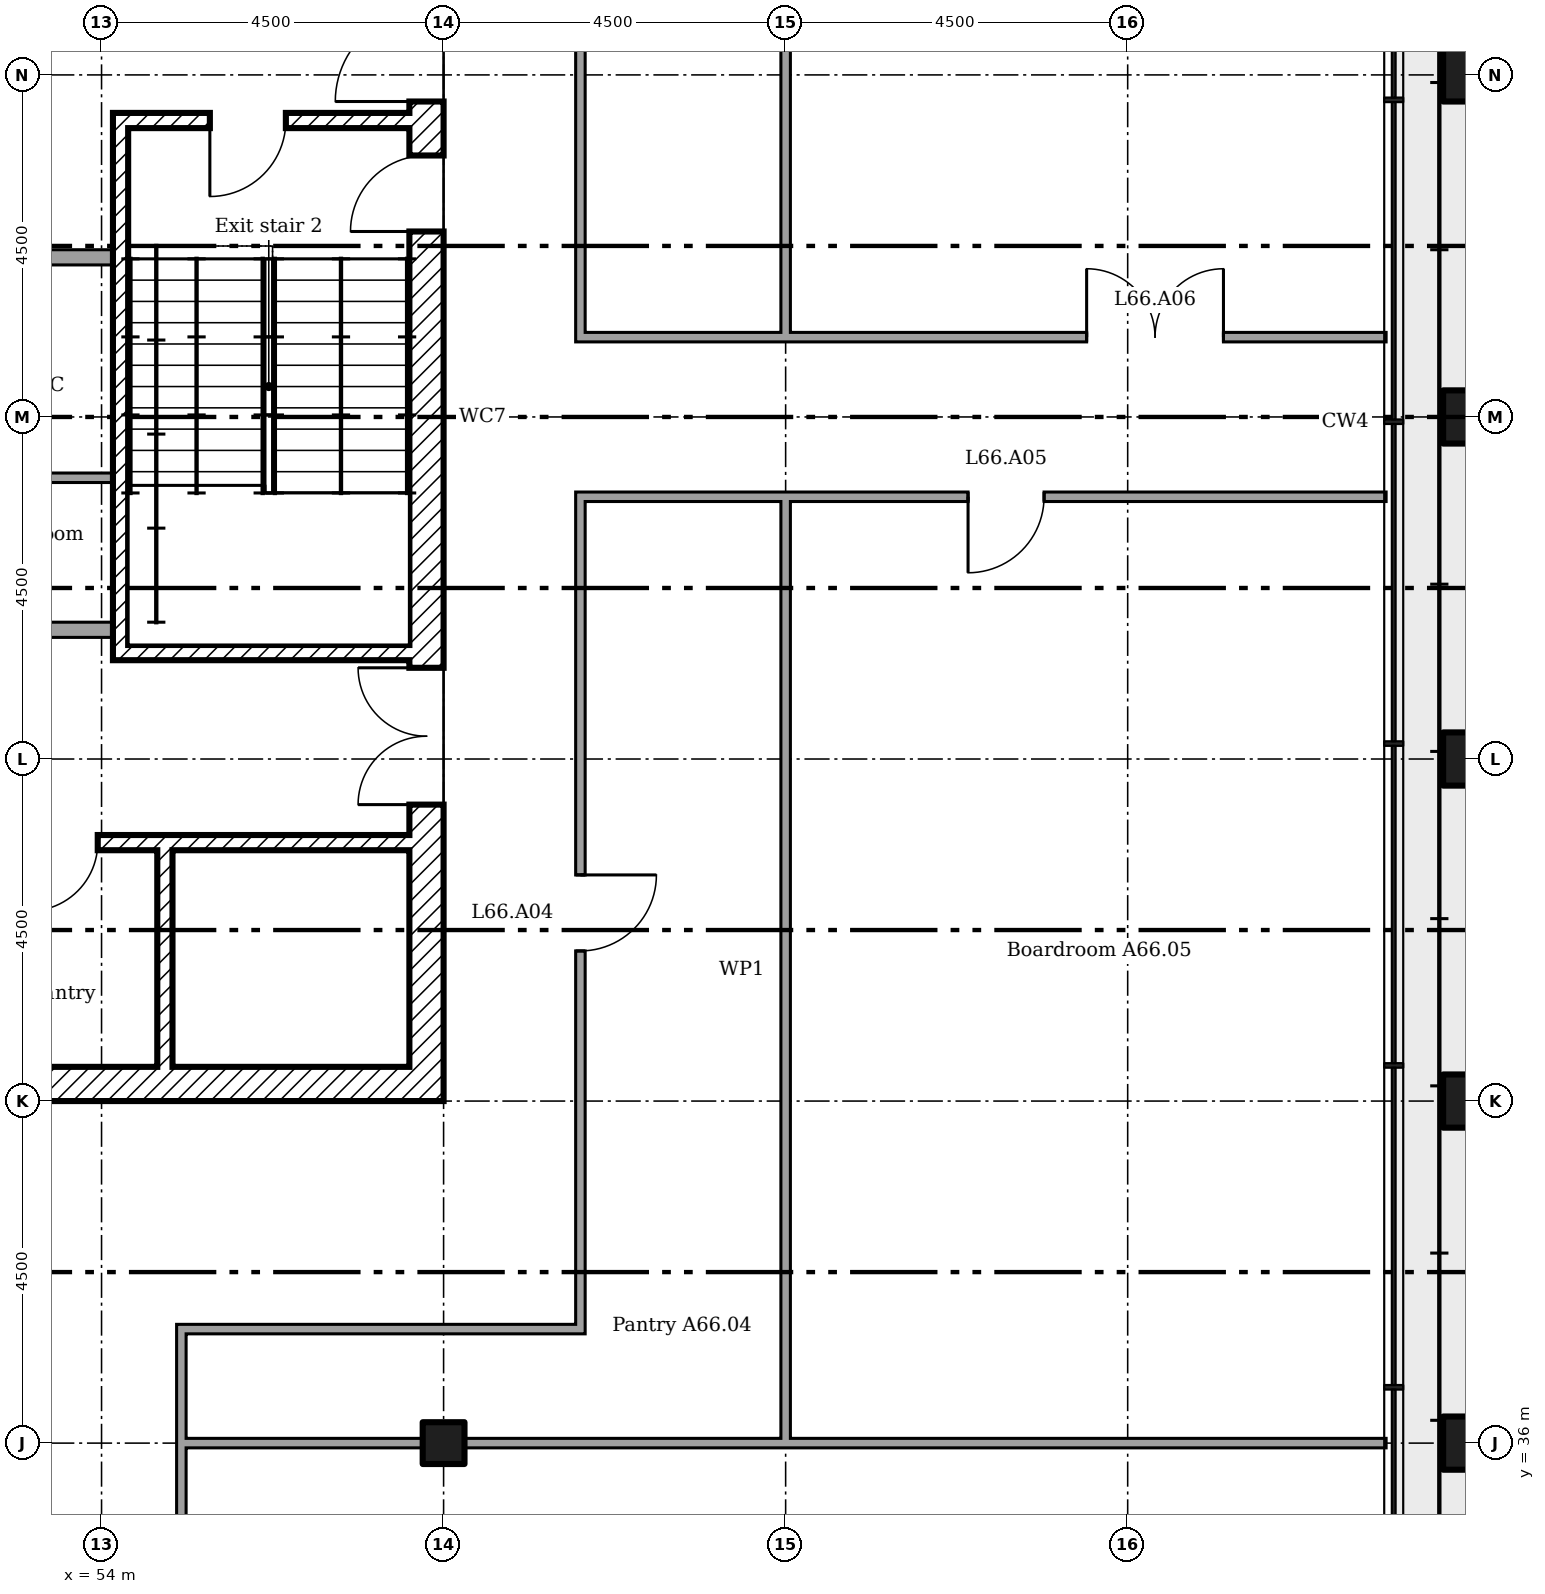
"""IFC4 building model, lengths in metres.
Left out: names, types, materials, properties, quantities, classifications, styles, units other than length and angle.
Written with IfcOpenShell. Run it as: python <this file> out.ifc"""

import sys

from ifc_helpers import new_model, si_unit, direction, frame, frame_2d, origin, origin_2d, place, context, subcontext, project, spatial, rectangle, extrude, element, fill, save


model = new_model("IFC4")
c1 = context("Model", 3, precision=1e-05, world=origin(), true_north=direction((0.0, 1.0)))
c2 = subcontext(c1, "Body", "Model", "MODEL_VIEW")
j1 = project(units=[si_unit("LENGTHUNIT", "METRE"), si_unit("PLANEANGLEUNIT", "RADIAN")], contexts=[c1])
p1 = place(None, origin())
s1 = spatial("IfcSite", under=j1, at=p1, CompositionType="ELEMENT")
p2 = place(p1, origin())
s2 = spatial("IfcBuilding", under=s1, at=p2, CompositionType="ELEMENT")
p3 = place(p2, frame((0.0, 0.0, 259.4)))
s3 = spatial("IfcBuildingStorey", under=s2, at=p3, CompositionType="ELEMENT", Elevation=259.4)
for number, where in (
    (1, (72.0, 36.0, 0.0)),
    (2, (72.0, 40.5, 0.0)),
    (3, (72.0, 45.0, 0.0)),
    (4, (72.0, 49.5, 0.0)),
    (5, (72.0, 54.0, 0.0)),
):
    element("IfcColumn", number, at=place(p3, frame(where)), inside=s3, PredefinedType="COLUMN", context=c2, shape_type="SweptSolid", body=[
        extrude(rectangle(XDim=0.7, YDim=0.7, at=origin_2d()), origin(), (0.0, 0.0, 1.0), 4.2),
    ])
p4 = place(p3, frame((58.5, 36.0, 0.0)))
e6 = element("IfcColumn", 6, at=p4, inside=s3, PredefinedType="COLUMN", context=c2, shape_type="SweptSolid", body=[
    extrude(rectangle(XDim=0.55, YDim=0.55, at=origin_2d()), origin(), (0.0, 0.0, 1.0), 4.2),
])
p5 = place(p3, frame((58.275, 40.5, 0.0), z_axis=(0.0, 0.0, 1.0), x_axis=(0.0, 1.0, 0.0)))
e7 = element("IfcWall", 7, at=p5, inside=s3, PredefinedType="SHEAR", context=c2, shape_type="SweptSolid", body=[
    extrude(rectangle(XDim=18.0, YDim=0.45, at=frame_2d((9.0, 0.0))), origin(), (0.0, 0.0, 1.0), 3.925),
])
p6 = place(p5, frame((13.15, 0.0, 0.0)))
e8 = element("IfcOpeningElement", 8, at=p6, cuts=e7, PredefinedType="OPENING", context=c2, shape_type="SweptSolid", body=[
    extrude(rectangle(XDim=1.2, YDim=2.1, at=frame_2d((0.6, 1.05))), frame((0.0, 0.235, 0.0), z_axis=(0.0, -1.0, 0.0), x_axis=(1.0, 0.0, 0.0)), (0.0, 0.0, 1.0), 0.47),
])
p7 = place(p5, frame((3.9, 0.0, 0.0)))
e9 = element("IfcOpeningElement", 9, at=p7, cuts=e7, PredefinedType="OPENING", context=c2, shape_type="SweptSolid", body=[
    extrude(rectangle(XDim=1.8, YDim=2.1, at=frame_2d((0.9, 1.05))), frame((0.0, 0.235, 0.0), z_axis=(0.0, -1.0, 0.0), x_axis=(1.0, 0.0, 0.0)), (0.0, 0.0, 1.0), 0.47),
])
p8 = place(p5, frame((11.44, 0.0, 0.0)))
e10 = element("IfcOpeningElement", 10, at=p8, cuts=e7, PredefinedType="OPENING", context=c2, shape_type="SweptSolid", body=[
    extrude(rectangle(XDim=1.0, YDim=2.1, at=frame_2d((0.5, 1.05))), frame((0.0, 0.235, 0.0), z_axis=(0.0, -1.0, 0.0), x_axis=(1.0, 0.0, 0.0)), (0.0, 0.0, 1.0), 0.47),
])
p9 = place(p3, frame((40.5, 40.725, 0.0)))
e11 = element("IfcWall", 11, at=p9, inside=s3, PredefinedType="SHEAR", context=c2, shape_type="SweptSolid", body=[
    extrude(rectangle(XDim=17.55, YDim=0.45, at=frame_2d((8.775, 0.0))), origin(), (0.0, 0.0, 1.0), 3.925),
])
p10 = place(p3, frame((54.833, 40.95, 0.0), z_axis=(0.0, 0.0, 1.0), x_axis=(0.0, 1.0, 0.0)))
e12 = element("IfcWall", 12, at=p10, inside=s3, PredefinedType="SHEAR", context=c2, shape_type="SweptSolid", body=[
    extrude(rectangle(XDim=2.85, YDim=0.2, at=frame_2d((1.425, 0.0))), origin(), (0.0, 0.0, 1.0), 3.925),
])
p11 = place(p3, frame((40.95, 43.9, 0.0)))
e13 = element("IfcWall", 13, at=p11, inside=s3, PredefinedType="SHEAR", context=c2, shape_type="SweptSolid", body=[
    extrude(rectangle(XDim=17.1, YDim=0.2, at=frame_2d((8.55, 0.0))), origin(), (0.0, 0.0, 1.0), 3.925),
])
p12 = place(p11, frame((1.433, 0.0, 0.0)))
e14 = element("IfcOpeningElement", 14, at=p12, cuts=e13, PredefinedType="OPENING", context=c2, shape_type="SweptSolid", body=[
    extrude(rectangle(XDim=0.9, YDim=2.1, at=frame_2d((0.45, 1.05))), frame((0.0, 0.11, 0.0), z_axis=(0.0, -1.0, 0.0), x_axis=(1.0, 0.0, 0.0)), (0.0, 0.0, 1.0), 0.22),
])
p13 = place(p11, frame((4.1, 0.0, 0.0)))
e15 = element("IfcOpeningElement", 15, at=p13, cuts=e13, PredefinedType="OPENING", context=c2, shape_type="SweptSolid", body=[
    extrude(rectangle(XDim=0.9, YDim=2.1, at=frame_2d((0.45, 1.05))), frame((0.0, 0.11, 0.0), z_axis=(0.0, -1.0, 0.0), x_axis=(1.0, 0.0, 0.0)), (0.0, 0.0, 1.0), 0.22),
])
p14 = place(p11, frame((6.767, 0.0, 0.0)))
e16 = element("IfcOpeningElement", 16, at=p14, cuts=e13, PredefinedType="OPENING", context=c2, shape_type="SweptSolid", body=[
    extrude(rectangle(XDim=0.9, YDim=2.1, at=frame_2d((0.45, 1.05))), frame((0.0, 0.11, 0.0), z_axis=(0.0, -1.0, 0.0), x_axis=(1.0, 0.0, 0.0)), (0.0, 0.0, 1.0), 0.22),
])
p15 = place(p11, frame((9.433, 0.0, 0.0)))
e17 = element("IfcOpeningElement", 17, at=p15, cuts=e13, PredefinedType="OPENING", context=c2, shape_type="SweptSolid", body=[
    extrude(rectangle(XDim=0.9, YDim=2.1, at=frame_2d((0.45, 1.05))), frame((0.0, 0.11, 0.0), z_axis=(0.0, -1.0, 0.0), x_axis=(1.0, 0.0, 0.0)), (0.0, 0.0, 1.0), 0.22),
])
p16 = place(p11, frame((12.1, 0.0, 0.0)))
e18 = element("IfcOpeningElement", 18, at=p16, cuts=e13, PredefinedType="OPENING", context=c2, shape_type="SweptSolid", body=[
    extrude(rectangle(XDim=0.9, YDim=2.1, at=frame_2d((0.45, 1.05))), frame((0.0, 0.11, 0.0), z_axis=(0.0, -1.0, 0.0), x_axis=(1.0, 0.0, 0.0)), (0.0, 0.0, 1.0), 0.22),
])
p17 = place(p3, frame((54.15, 53.4, 0.0)))
e19 = element("IfcWall", 19, at=p17, inside=s3, PredefinedType="SHEAR", context=c2, shape_type="SweptSolid", body=[
    extrude(rectangle(XDim=3.9, YDim=0.2, at=frame_2d((1.95, 0.0))), origin(), (0.0, 0.0, 1.0), 3.925),
])
p18 = place(p17, frame((1.275, 0.0, 0.0)))
e20 = element("IfcOpeningElement", 20, at=p18, cuts=e19, PredefinedType="OPENING", context=c2, shape_type="SweptSolid", body=[
    extrude(rectangle(XDim=1.0, YDim=2.1, at=frame_2d((0.5, 1.05))), frame((0.0, 0.11, 0.0), z_axis=(0.0, -1.0, 0.0), x_axis=(1.0, 0.0, 0.0)), (0.0, 0.0, 1.0), 0.22),
])
p19 = place(p3, frame((54.15, 46.4, 0.0)))
e21 = element("IfcWall", 21, at=p19, inside=s3, PredefinedType="SHEAR", context=c2, shape_type="SweptSolid", body=[
    extrude(rectangle(XDim=3.9, YDim=0.2, at=frame_2d((1.95, 0.0))), origin(), (0.0, 0.0, 1.0), 3.925),
])
p20 = place(p3, frame((54.25, 46.5, 0.0), z_axis=(0.0, 0.0, 1.0), x_axis=(0.0, 1.0, 0.0)))
e22 = element("IfcWall", 22, at=p20, inside=s3, PredefinedType="SHEAR", context=c2, shape_type="SweptSolid", body=[
    extrude(rectangle(XDim=6.8, YDim=0.2, at=frame_2d((3.4, 0.0))), origin(), (0.0, 0.0, 1.0), 3.925),
])
p21 = place(p3, frame((44.85, 51.6, 0.0)))
e23 = element("IfcWall", 23, at=p21, inside=s3, PredefinedType="PARTITIONING", context=c2, shape_type="SweptSolid", body=[
    extrude(rectangle(XDim=9.3, YDim=0.2, at=frame_2d((4.65, 0.0))), origin(), (0.0, 0.0, 1.0), 3.925),
])
p22 = place(p21, frame((4.075, 0.0, 0.0)))
e24 = element("IfcOpeningElement", 24, at=p22, cuts=e23, PredefinedType="OPENING", context=c2, shape_type="SweptSolid", body=[
    extrude(rectangle(XDim=0.9, YDim=2.1, at=frame_2d((0.45, 1.05))), frame((0.0, 0.11, 0.0), z_axis=(0.0, -1.0, 0.0), x_axis=(1.0, 0.0, 0.0)), (0.0, 0.0, 1.0), 0.22),
])
p23 = place(p21, frame((6.825, 0.0, 0.0)))
e25 = element("IfcOpeningElement", 25, at=p23, cuts=e23, PredefinedType="OPENING", context=c2, shape_type="SweptSolid", body=[
    extrude(rectangle(XDim=0.9, YDim=2.1, at=frame_2d((0.45, 1.05))), frame((0.0, 0.11, 0.0), z_axis=(0.0, -1.0, 0.0), x_axis=(1.0, 0.0, 0.0)), (0.0, 0.0, 1.0), 0.22),
])
p24 = place(p3, frame((44.85, 46.7, 0.0)))
e26 = element("IfcWall", 26, at=p24, inside=s3, PredefinedType="PARTITIONING", context=c2, shape_type="SweptSolid", body=[
    extrude(rectangle(XDim=9.3, YDim=0.2, at=frame_2d((4.65, 0.0))), origin(), (0.0, 0.0, 1.0), 3.925),
])
p25 = place(p24, frame((2.175, 0.0, 0.0)))
e27 = element("IfcOpeningElement", 27, at=p25, cuts=e26, PredefinedType="OPENING", context=c2, shape_type="SweptSolid", body=[
    extrude(rectangle(XDim=0.9, YDim=2.1, at=frame_2d((0.45, 1.05))), frame((0.0, 0.11, 0.0), z_axis=(0.0, -1.0, 0.0), x_axis=(1.0, 0.0, 0.0)), (0.0, 0.0, 1.0), 0.22),
])
p26 = place(p24, frame((6.825, 0.0, 0.0)))
e28 = element("IfcOpeningElement", 28, at=p26, cuts=e26, PredefinedType="OPENING", context=c2, shape_type="SweptSolid", body=[
    extrude(rectangle(XDim=0.9, YDim=2.1, at=frame_2d((0.45, 1.05))), frame((0.0, 0.11, 0.0), z_axis=(0.0, -1.0, 0.0), x_axis=(1.0, 0.0, 0.0)), (0.0, 0.0, 1.0), 0.22),
])
p27 = place(p3, frame((54.15, 48.7, 0.0), z_axis=(0.0, 0.0, 1.0), x_axis=(-1.0, 0.0, 0.0)))
e29 = element("IfcWall", 29, at=p27, inside=s3, PredefinedType="PARTITIONING", context=c2, shape_type="SweptSolid", body=[
    extrude(rectangle(XDim=3.987, YDim=0.125, at=frame_2d((1.994, 0.0))), origin(), (0.0, 0.0, 1.0), 3.925),
])
p28 = place(p3, frame((55.05, 36.0, 0.0)))
e30 = element("IfcWall", 30, at=p28, inside=s3, PredefinedType="PARTITIONING", context=c2, shape_type="SweptSolid", body=[
    extrude(rectangle(XDim=3.175, YDim=0.125, at=frame_2d((1.587, 0.0))), origin(), (0.0, 0.0, 1.0), 4.025),
])
p29 = place(p3, frame((58.775, 36.0, 0.0)))
e31 = element("IfcWall", 31, at=p29, inside=s3, PredefinedType="PARTITIONING", context=c2, shape_type="SweptSolid", body=[
    extrude(rectangle(XDim=12.125, YDim=0.125, at=frame_2d((6.062, 0.0))), origin(), (0.0, 0.0, 1.0), 3.267),
])
p30 = place(p3, frame((54.988, 37.5, 0.0)))
e32 = element("IfcWall", 32, at=p30, inside=s3, PredefinedType="PARTITIONING", context=c2, shape_type="SweptSolid", body=[
    extrude(rectangle(XDim=5.375, YDim=0.125, at=frame_2d((2.688, 0.0))), origin(), (0.0, 0.0, 1.0), 4.025),
])
p31 = place(p3, frame((60.238, 48.45, 0.0)))
e33 = element("IfcWall", 33, at=p31, inside=s3, PredefinedType="PARTITIONING", context=c2, shape_type="SweptSolid", body=[
    extrude(rectangle(XDim=10.662, YDim=0.125, at=frame_2d((5.331, 0.0))), origin(), (0.0, 0.0, 1.0), 4.025),
])
p32 = place(p31, frame((5.163, 0.0, 0.0)))
e34 = element("IfcOpeningElement", 34, at=p32, cuts=e33, PredefinedType="OPENING", context=c2, shape_type="SweptSolid", body=[
    extrude(rectangle(XDim=1.0, YDim=2.1, at=frame_2d((0.5, 1.05))), frame((0.0, 0.073, 0.0), z_axis=(0.0, -1.0, 0.0), x_axis=(1.0, 0.0, 0.0)), (0.0, 0.0, 1.0), 0.145),
])
p33 = place(p3, frame((60.238, 50.55, 0.0)))
e35 = element("IfcWall", 35, at=p33, inside=s3, PredefinedType="PARTITIONING", context=c2, shape_type="SweptSolid", body=[
    extrude(rectangle(XDim=10.662, YDim=0.125, at=frame_2d((5.331, 0.0))), origin(), (0.0, 0.0, 1.0), 4.025),
])
p34 = place(p33, frame((6.722, 0.0, 0.0)))
e36 = element("IfcOpeningElement", 36, at=p34, cuts=e35, PredefinedType="OPENING", context=c2, shape_type="SweptSolid", body=[
    extrude(rectangle(XDim=1.8, YDim=2.1, at=frame_2d((0.9, 1.05))), frame((0.0, 0.073, 0.0), z_axis=(0.0, -1.0, 0.0), x_axis=(1.0, 0.0, 0.0)), (0.0, 0.0, 1.0), 0.145),
])
p35 = place(p3, frame((55.05, 28.1, 0.0), z_axis=(0.0, 0.0, 1.0), x_axis=(0.0, 1.0, 0.0)))
e37 = element("IfcWall", 37, at=p35, inside=s3, PredefinedType="PARTITIONING", context=c2, shape_type="SweptSolid", body=[
    extrude(rectangle(XDim=9.337, YDim=0.125, at=frame_2d((4.669, 0.0))), origin(), (0.0, 0.0, 1.0), 4.025),
])
p36 = place(p35, frame((3.96, 0.0, 0.0)))
e38 = element("IfcOpeningElement", 38, at=p36, cuts=e37, PredefinedType="OPENING", context=c2, shape_type="SweptSolid", body=[
    extrude(rectangle(XDim=1.8, YDim=2.1, at=frame_2d((0.9, 1.05))), frame((0.0, 0.073, 0.0), z_axis=(0.0, -1.0, 0.0), x_axis=(1.0, 0.0, 0.0)), (0.0, 0.0, 1.0), 0.145),
])
p37 = place(p3, frame((60.3, 37.562, 0.0), z_axis=(0.0, 0.0, 1.0), x_axis=(0.0, 1.0, 0.0)))
e39 = element("IfcWall", 39, at=p37, inside=s3, PredefinedType="PARTITIONING", context=c2, shape_type="SweptSolid", body=[
    extrude(rectangle(XDim=10.825, YDim=0.125, at=frame_2d((5.413, 0.0))), origin(), (0.0, 0.0, 1.0), 4.025),
])
p38 = place(p37, frame((4.913, 0.0, 0.0)))
e40 = element("IfcOpeningElement", 40, at=p38, cuts=e39, PredefinedType="OPENING", context=c2, shape_type="SweptSolid", body=[
    extrude(rectangle(XDim=1.0, YDim=2.1, at=frame_2d((0.5, 1.05))), frame((0.0, 0.073, 0.0), z_axis=(0.0, -1.0, 0.0), x_axis=(1.0, 0.0, 0.0)), (0.0, 0.0, 1.0), 0.145),
])
p39 = place(p3, frame((60.3, 50.613, 0.0), z_axis=(0.0, 0.0, 1.0), x_axis=(0.0, 1.0, 0.0)))
e41 = element("IfcWall", 41, at=p39, inside=s3, PredefinedType="PARTITIONING", context=c2, shape_type="SweptSolid", body=[
    extrude(rectangle(XDim=10.225, YDim=0.125, at=frame_2d((5.112, 0.0))), origin(), (0.0, 0.0, 1.0), 4.025),
])
p40 = place(p39, frame((4.613, 0.0, 0.0)))
e42 = element("IfcOpeningElement", 42, at=p40, cuts=e41, PredefinedType="OPENING", context=c2, shape_type="SweptSolid", body=[
    extrude(rectangle(XDim=1.0, YDim=2.1, at=frame_2d((0.5, 1.05))), frame((0.0, 0.073, 0.0), z_axis=(0.0, -1.0, 0.0), x_axis=(1.0, 0.0, 0.0)), (0.0, 0.0, 1.0), 0.145),
])
p41 = place(p3, frame((63.0, 36.0, 0.0), z_axis=(0.0, 0.0, 1.0), x_axis=(0.0, 1.0, 0.0)))
e43 = element("IfcWall", 43, at=p41, inside=s3, PredefinedType="PARTITIONING", context=c2, shape_type="SweptSolid", body=[
    extrude(rectangle(XDim=12.45, YDim=0.125, at=frame_2d((6.225, 0.0))), origin(), (0.0, 0.0, 1.0), 4.025),
])
p42 = place(p3, frame((63.0, 50.55, 0.0), z_axis=(0.0, 0.0, 1.0), x_axis=(0.0, 1.0, 0.0)))
e44 = element("IfcWall", 44, at=p42, inside=s3, PredefinedType="PARTITIONING", context=c2, shape_type="SweptSolid", body=[
    extrude(rectangle(XDim=7.675, YDim=0.125, at=frame_2d((3.837, 0.0))), origin(), (0.0, 0.0, 1.0), 4.025),
])
p43 = place(p6, origin())
e45 = element("IfcDoor", 45, at=p43, inside=s3, OperationType="SINGLE_SWING_RIGHT", PredefinedType="DOOR", context=c2, shape_type="SweptSolid", body=[
    extrude(rectangle(XDim=1.2, YDim=2.1, at=frame_2d((0.6, 1.05))), frame((0.0, 0.025, 0.0), z_axis=(0.0, -1.0, 0.0), x_axis=(1.0, 0.0, 0.0)), (0.0, 0.0, 1.0), 0.05),
])
fill(e8, e45)
p44 = place(p7, origin())
e46 = element("IfcDoor", 46, at=p44, inside=s3, OperationType="DOUBLE_DOOR_SINGLE_SWING", PredefinedType="DOOR", context=c2, shape_type="SweptSolid", body=[
    extrude(rectangle(XDim=1.8, YDim=2.1, at=frame_2d((0.9, 1.05))), frame((0.0, 0.025, 0.0), z_axis=(0.0, -1.0, 0.0), x_axis=(1.0, 0.0, 0.0)), (0.0, 0.0, 1.0), 0.05),
])
fill(e9, e46)
p45 = place(p18, frame((1.0, 0.0, 0.0), x_axis=(-1.0, 0.0, 0.0)))
e47 = element("IfcDoor", 47, at=p45, inside=s3, OperationType="SINGLE_SWING_LEFT", PredefinedType="DOOR", context=c2, shape_type="SweptSolid", body=[
    extrude(rectangle(XDim=1.0, YDim=2.1, at=frame_2d((0.5, 1.05))), frame((0.0, 0.025, 0.0), z_axis=(0.0, -1.0, 0.0), x_axis=(1.0, 0.0, 0.0)), (0.0, 0.0, 1.0), 0.05),
])
fill(e20, e47)
p46 = place(p8, origin())
e48 = element("IfcDoor", 48, at=p46, inside=s3, OperationType="SINGLE_SWING_RIGHT", PredefinedType="DOOR", context=c2, shape_type="SweptSolid", body=[
    extrude(rectangle(XDim=1.0, YDim=2.1, at=frame_2d((0.5, 1.05))), frame((0.0, 0.025, 0.0), z_axis=(0.0, -1.0, 0.0), x_axis=(1.0, 0.0, 0.0)), (0.0, 0.0, 1.0), 0.05),
])
fill(e10, e48)
p47 = place(p16, frame((0.9, 0.0, 0.0), x_axis=(-1.0, 0.0, 0.0)))
e49 = element("IfcDoor", 49, at=p47, inside=s3, OperationType="SINGLE_SWING_LEFT", PredefinedType="DOOR", context=c2, shape_type="SweptSolid", body=[
    extrude(rectangle(XDim=0.9, YDim=2.1, at=frame_2d((0.45, 1.05))), frame((0.0, 0.025, 0.0), z_axis=(0.0, -1.0, 0.0), x_axis=(1.0, 0.0, 0.0)), (0.0, 0.0, 1.0), 0.05),
])
fill(e18, e49)
p48 = place(p38, frame((1.0, 0.0, 0.0), x_axis=(-1.0, 0.0, 0.0)))
e50 = element("IfcDoor", 50, at=p48, inside=s3, OperationType="SINGLE_SWING_RIGHT", PredefinedType="DOOR", context=c2, shape_type="SweptSolid", body=[
    extrude(rectangle(XDim=1.0, YDim=2.1, at=frame_2d((0.5, 1.05))), frame((0.0, 0.025, 0.0), z_axis=(0.0, -1.0, 0.0), x_axis=(1.0, 0.0, 0.0)), (0.0, 0.0, 1.0), 0.05),
])
fill(e40, e50)
p49 = place(p32, frame((1.0, 0.0, 0.0), x_axis=(-1.0, 0.0, 0.0)))
e51 = element("IfcDoor", 51, at=p49, inside=s3, OperationType="SINGLE_SWING_LEFT", PredefinedType="DOOR", context=c2, shape_type="SweptSolid", body=[
    extrude(rectangle(XDim=1.0, YDim=2.1, at=frame_2d((0.5, 1.05))), frame((0.0, 0.025, 0.0), z_axis=(0.0, -1.0, 0.0), x_axis=(1.0, 0.0, 0.0)), (0.0, 0.0, 1.0), 0.05),
])
fill(e34, e51)
p50 = place(p34, origin())
e52 = element("IfcDoor", 52, at=p50, inside=s3, OperationType="DOUBLE_DOOR_SINGLE_SWING", PredefinedType="DOOR", context=c2, shape_type="SweptSolid", body=[
    extrude(rectangle(XDim=1.8, YDim=2.1, at=frame_2d((0.9, 1.05))), frame((0.0, 0.025, 0.0), z_axis=(0.0, -1.0, 0.0), x_axis=(1.0, 0.0, 0.0)), (0.0, 0.0, 1.0), 0.05),
])
fill(e36, e52)
save(model, sys.argv[1])
